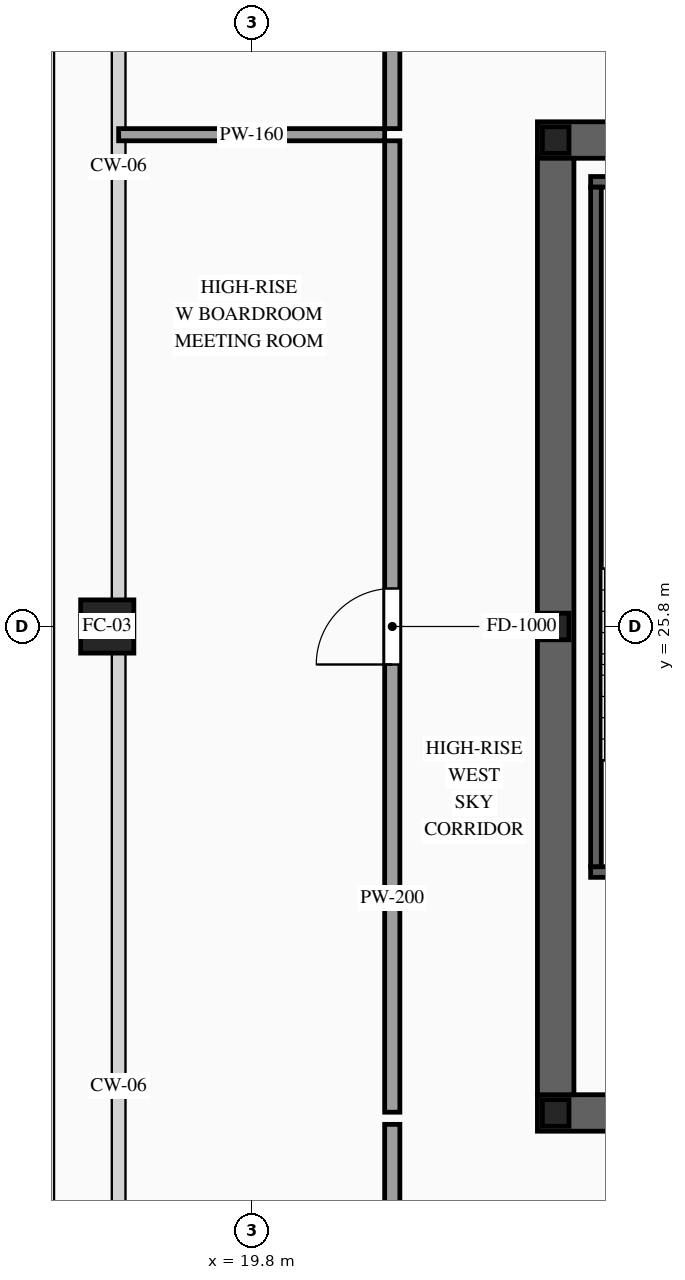
"""IFC4 building model, lengths in metres.
Left out: names, types, materials, properties, quantities, classifications, styles, units other than length and angle.
Written with IfcOpenShell. Run it as: python <this file> out.ifc"""

import sys

from ifc_helpers import new_model, si_unit, direction, frame, frame_2d, origin, origin_2d, place, context, subcontext, project, spatial, rectangle, hollow_rectangle, i_section, extrude, source, transform, mapped, element, fill, save


model = new_model("IFC4")
c1 = context("Model", 3, precision=1e-05, world=origin(), true_north=direction((0.0, 1.0)))
c2 = subcontext(c1, "Body", "Model", "MODEL_VIEW")
j1 = project(units=[si_unit("LENGTHUNIT", "METRE"), si_unit("PLANEANGLEUNIT", "RADIAN")], contexts=[c1])
p1 = place(None, origin())
s1 = spatial("IfcSite", under=j1, at=p1, CompositionType="ELEMENT")
p2 = place(p1, origin())
s2 = spatial("IfcBuilding", under=s1, at=p2, CompositionType="ELEMENT")
p3 = place(p2, frame((0.0, 0.0, 289.1)))
s3 = spatial("IfcBuildingStorey", under=s2, at=p3, CompositionType="ELEMENT", Elevation=289.1)
p4 = place(p3, frame((23.56, 19.4, 0.0), z_axis=(0.0, 0.0, 1.0), x_axis=(1.0, 0.0, 0.0)))
e1 = element("IfcWall", 1, at=p4, inside=s3, PredefinedType="SHEAR", context=c2, shape_type="SweptSolid", body=[
    extrude(rectangle(XDim=26.88, YDim=0.48, at=frame_2d((13.44, 0.0))), origin(), (0.0, 0.0, 1.0), 3.5),
])
p5 = place(p4, frame((1.89, 0.0, 0.0)))
e2 = element("IfcOpeningElement", 2, at=p5, cuts=e1, PredefinedType="OPENING", context=c2, shape_type="SweptSolid", body=[
    extrude(rectangle(XDim=1.1, YDim=2.2, at=frame_2d((0.55, 1.1))), frame((0.0, 0.255, 0.0), z_axis=(0.0, -1.0, 0.0), x_axis=(1.0, 0.0, 0.0)), (0.0, 0.0, 1.0), 0.51),
])
p6 = place(p4, frame((9.79, 0.0, 0.0)))
e3 = element("IfcOpeningElement", 3, at=p6, cuts=e1, PredefinedType="OPENING", context=c2, shape_type="SweptSolid", body=[
    extrude(rectangle(XDim=1.1, YDim=2.2, at=frame_2d((0.55, 1.1))), frame((0.0, 0.255, 0.0), z_axis=(0.0, -1.0, 0.0), x_axis=(1.0, 0.0, 0.0)), (0.0, 0.0, 1.0), 0.51),
])
p7 = place(p4, frame((22.99, 0.0, 0.0)))
e4 = element("IfcOpeningElement", 4, at=p7, cuts=e1, PredefinedType="OPENING", context=c2, shape_type="SweptSolid", body=[
    extrude(rectangle(XDim=1.1, YDim=2.2, at=frame_2d((0.55, 1.1))), frame((0.0, 0.255, 0.0), z_axis=(0.0, -1.0, 0.0), x_axis=(1.0, 0.0, 0.0)), (0.0, 0.0, 1.0), 0.51),
])
p8 = place(p4, frame((19.61, 0.0, 0.0)))
e5 = element("IfcOpeningElement", 5, at=p8, cuts=e1, PredefinedType="OPENING", context=c2, shape_type="SweptSolid", body=[
    extrude(rectangle(XDim=0.9, YDim=2.15, at=frame_2d((0.45, 1.075))), frame((0.0, 0.255, 0.0), z_axis=(0.0, -1.0, 0.0), x_axis=(1.0, 0.0, 0.0)), (0.0, 0.0, 1.0), 0.51),
])
p9 = place(p4, frame((18.17, 0.0, 0.0)))
e6 = element("IfcOpeningElement", 6, at=p9, cuts=e1, PredefinedType="OPENING", context=c2, shape_type="SweptSolid", body=[
    extrude(rectangle(XDim=0.9, YDim=2.15, at=frame_2d((0.45, 1.075))), frame((0.0, 0.255, 0.0), z_axis=(0.0, -1.0, 0.0), x_axis=(1.0, 0.0, 0.0)), (0.0, 0.0, 1.0), 0.51),
])
p10 = place(p3, frame((23.56, 32.2, 0.0), z_axis=(0.0, 0.0, 1.0), x_axis=(1.0, 0.0, 0.0)))
e7 = element("IfcWall", 7, at=p10, inside=s3, PredefinedType="SHEAR", context=c2, shape_type="SweptSolid", body=[
    extrude(rectangle(XDim=26.88, YDim=0.48, at=frame_2d((13.44, 0.0))), origin(), (0.0, 0.0, 1.0), 3.5),
])
p11 = place(p10, frame((4.51, 0.0, 0.0)))
e8 = element("IfcOpeningElement", 8, at=p11, cuts=e7, PredefinedType="OPENING", context=c2, shape_type="SweptSolid", body=[
    extrude(rectangle(XDim=0.9, YDim=2.15, at=frame_2d((0.45, 1.075))), frame((0.0, 0.255, 0.0), z_axis=(0.0, -1.0, 0.0), x_axis=(1.0, 0.0, 0.0)), (0.0, 0.0, 1.0), 0.51),
])
p12 = place(p10, frame((9.79, 0.0, 0.0)))
e9 = element("IfcOpeningElement", 9, at=p12, cuts=e7, PredefinedType="OPENING", context=c2, shape_type="SweptSolid", body=[
    extrude(rectangle(XDim=1.1, YDim=2.2, at=frame_2d((0.55, 1.1))), frame((0.0, 0.255, 0.0), z_axis=(0.0, -1.0, 0.0), x_axis=(1.0, 0.0, 0.0)), (0.0, 0.0, 1.0), 0.51),
])
p13 = place(p10, frame((15.64, 0.0, 0.0)))
e10 = element("IfcOpeningElement", 10, at=p13, cuts=e7, PredefinedType="OPENING", context=c2, shape_type="SweptSolid", body=[
    extrude(rectangle(XDim=1.1, YDim=2.2, at=frame_2d((0.55, 1.1))), frame((0.0, 0.255, 0.0), z_axis=(0.0, -1.0, 0.0), x_axis=(1.0, 0.0, 0.0)), (0.0, 0.0, 1.0), 0.51),
])
p14 = place(p10, frame((18.74, 0.0, 0.0)))
e11 = element("IfcOpeningElement", 11, at=p14, cuts=e7, PredefinedType="OPENING", context=c2, shape_type="SweptSolid", body=[
    extrude(rectangle(XDim=1.1, YDim=2.2, at=frame_2d((0.55, 1.1))), frame((0.0, 0.255, 0.0), z_axis=(0.0, -1.0, 0.0), x_axis=(1.0, 0.0, 0.0)), (0.0, 0.0, 1.0), 0.51),
])
m1 = source(origin(), c2, "Body", "SweptSolid", [
    extrude(rectangle(XDim=12.32, YDim=0.48, at=frame_2d((6.16, 0.0))), origin(), (0.0, 0.0, 1.0), 3.5),
])
p15 = place(p3, frame((23.8, 19.64, 0.0), z_axis=(0.0, 0.0, 1.0), x_axis=(0.0, 1.0, 0.0)))
e12 = element("IfcWall", 12, at=p15, inside=s3, PredefinedType="SHEAR", context=c2, shape_type="MappedRepresentation", body=[
    mapped(m1, transform((0.0, 0.0, 0.0), scale=1.0)),
])
m2 = source(origin(), c2, "Body", "SweptSolid", [
    extrude(i_section(OverallWidth=0.35, OverallDepth=0.35, WebThickness=0.012, FlangeThickness=0.019, at=origin_2d()), origin(), (0.0, 0.0, 1.0), 3.5),
])
for number, where, z_axis, x_axis in (
    (13, (23.8, 19.4, 0.0), (0.0, 0.0, 1.0), (1.0, 0.0, 0.0)),
    (14, (23.8, 25.8, 0.0), (0.0, 0.0, 1.0), (1.0, 0.0, 0.0)),
    (15, (23.8, 32.2, 0.0), (0.0, 0.0, 1.0), (1.0, 0.0, 0.0)),
):
    element("IfcColumn", number, at=place(p3, frame(where, z_axis=z_axis, x_axis=x_axis)), inside=s3, PredefinedType="COLUMN", context=c2, shape_type="MappedRepresentation", body=[
        mapped(m2, transform((0.0, 0.0, 0.0), scale=1.0)),
    ])
m3 = source(origin(), c2, "Body", "SweptSolid", [
    extrude(hollow_rectangle(XDim=0.7, YDim=0.7, WallThickness=0.032, at=origin_2d()), origin(), (0.0, 0.0, 1.0), 3.5),
])
p16 = place(p3, frame((17.9, 25.8, 0.0), z_axis=(0.0, 0.0, 1.0), x_axis=(1.0, 0.0, 0.0)))
e16 = element("IfcColumn", 16, at=p16, inside=s3, PredefinedType="COLUMN", context=c2, shape_type="MappedRepresentation", body=[
    mapped(m3, transform((0.0, 0.0, 0.0), scale=1.0)),
])
p17 = place(p3, frame((24.26, 22.57, 0.0), z_axis=(0.0, 0.0, 1.0), x_axis=(1.0, 0.0, 0.0)))
e17 = element("IfcWall", 17, at=p17, inside=s3, PredefinedType="SOLIDWALL", context=c2, shape_type="SweptSolid", body=[
    extrude(rectangle(XDim=3.28, YDim=0.14, at=frame_2d((1.64, 0.0))), origin(), (0.0, 0.0, 1.0), 3.28),
])
p18 = place(p17, frame((1.09, 0.0, 0.0)))
e18 = element("IfcOpeningElement", 18, at=p18, cuts=e17, PredefinedType="OPENING", context=c2, shape_type="SweptSolid", body=[
    extrude(rectangle(XDim=1.1, YDim=2.2, at=frame_2d((0.55, 1.1))), frame((0.0, 0.085, 0.0), z_axis=(0.0, -1.0, 0.0), x_axis=(1.0, 0.0, 0.0)), (0.0, 0.0, 1.0), 0.17),
])
m4 = source(origin(), c2, "Body", "SweptSolid", [
    extrude(rectangle(XDim=3.28, YDim=0.14, at=frame_2d((1.64, 0.0))), origin(), (0.0, 0.0, 1.0), 3.28),
])
p19 = place(p3, frame((24.26, 31.65, 0.0), z_axis=(0.0, 0.0, 1.0), x_axis=(1.0, 0.0, 0.0)))
e19 = element("IfcWall", 19, at=p19, inside=s3, PredefinedType="SOLIDWALL", context=c2, shape_type="MappedRepresentation", body=[
    mapped(m4, transform((0.0, 0.0, 0.0), scale=1.0)),
])
m5 = source(origin(), c2, "Body", "SweptSolid", [
    extrude(rectangle(XDim=8.94, YDim=0.14, at=frame_2d((4.47, 0.0))), origin(), (0.0, 0.0, 1.0), 3.28),
])
p20 = place(p3, frame((24.33, 22.64, 0.0), z_axis=(0.0, 0.0, 1.0), x_axis=(0.0, 1.0, 0.0)))
e20 = element("IfcWall", 20, at=p20, inside=s3, PredefinedType="SOLIDWALL", context=c2, shape_type="MappedRepresentation", body=[
    mapped(m5, transform((0.0, 0.0, 0.0), scale=1.0)),
])
m6 = source(origin(), c2, "Body", "SweptSolid", [
    extrude(rectangle(XDim=1.7, YDim=0.2, at=frame_2d((0.85, 0.0))), origin(), (0.0, 0.0, 1.0), 3.28),
])
for number, where, z_axis, x_axis in (
    (21, (21.65, 32.35, 0.0), (0.0, 0.0, 1.0), (0.0, 1.0, 0.0)),
    (22, (21.65, 17.55, 0.0), (0.0, 0.0, 1.0), (0.0, 1.0, 0.0)),
):
    element("IfcWall", number, at=place(p3, frame(where, z_axis=z_axis, x_axis=x_axis)), inside=s3, PredefinedType="PARTITIONING", context=c2, shape_type="MappedRepresentation", body=[
        mapped(m6, transform((0.0, 0.0, 0.0), scale=1.0)),
    ])
p21 = place(p3, frame((21.65, 19.41, 0.0), z_axis=(0.0, 0.0, 1.0), x_axis=(0.0, 1.0, 0.0)))
e23 = element("IfcWall", 23, at=p21, inside=s3, PredefinedType="PARTITIONING", context=c2, shape_type="SweptSolid", body=[
    extrude(rectangle(XDim=12.78, YDim=0.2, at=frame_2d((6.39, 0.0))), origin(), (0.0, 0.0, 1.0), 3.28),
])
p22 = place(p21, frame((5.89, 0.0, 0.0)))
e24 = element("IfcOpeningElement", 24, at=p22, cuts=e23, PredefinedType="OPENING", context=c2, shape_type="SweptSolid", body=[
    extrude(rectangle(XDim=1.0, YDim=2.2, at=frame_2d((0.5, 1.1))), frame((0.0, 0.115, 0.0), z_axis=(0.0, -1.0, 0.0), x_axis=(1.0, 0.0, 0.0)), (0.0, 0.0, 1.0), 0.23),
])
m7 = source(origin(), c2, "Body", "SweptSolid", [
    extrude(rectangle(XDim=3.5, YDim=0.16, at=frame_2d((1.75, 0.0))), origin(), (0.0, 0.0, 1.0), 2.825),
])
p23 = place(p3, frame((18.05, 32.27, 0.0), z_axis=(0.0, 0.0, 1.0), x_axis=(1.0, 0.0, 0.0)))
e25 = element("IfcWall", 25, at=p23, inside=s3, PredefinedType="PARTITIONING", context=c2, shape_type="MappedRepresentation", body=[
    mapped(m7, transform((0.0, 0.0, 0.0), scale=1.0)),
])
m8 = source(origin(), c2, "Body", "SweptSolid", [
    extrude(rectangle(XDim=1.0, YDim=2.2, at=frame_2d((0.5, 1.1))), frame((0.0, 0.025, 0.0), z_axis=(0.0, -1.0, 0.0), x_axis=(1.0, 0.0, 0.0)), (0.0, 0.0, 1.0), 0.05),
])
p24 = place(p22, origin())
e26 = element("IfcDoor", 26, at=p24, inside=s3, OperationType="SINGLE_SWING_LEFT", PredefinedType="DOOR", context=c2, shape_type="MappedRepresentation", body=[
    mapped(m8, transform((0.0, 0.0, 0.0), scale=1.0)),
])
fill(e24, e26)
save(model, sys.argv[1])
